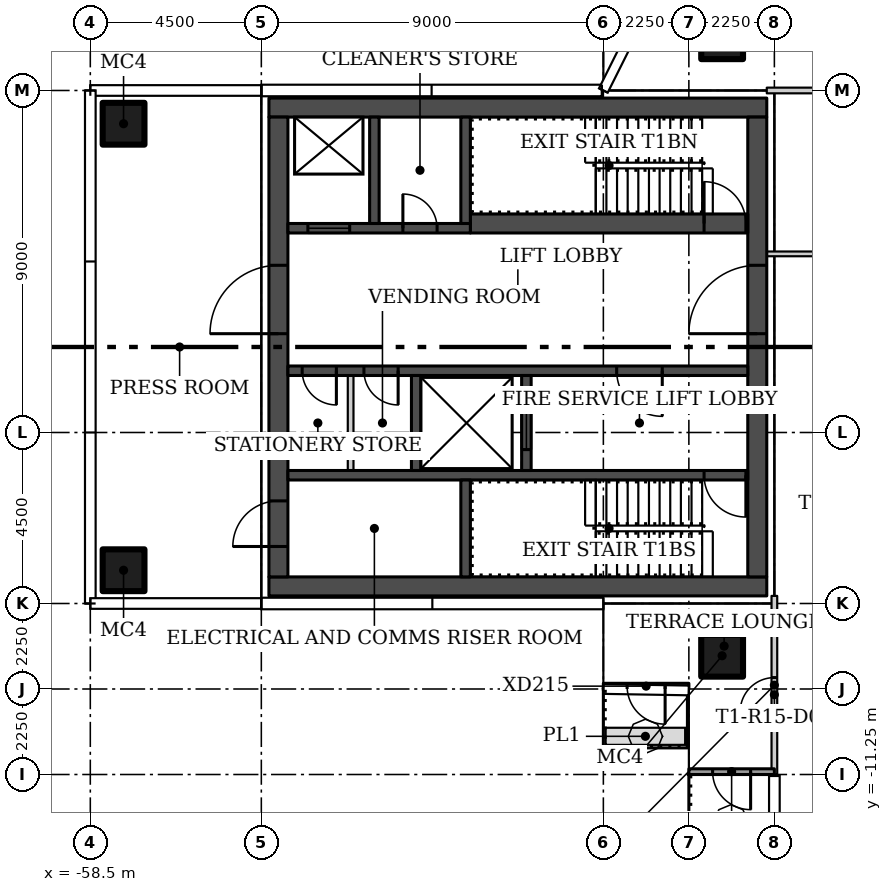
"""IFC4 building model, lengths in metres.
Left out: names, types, materials, properties, quantities, classifications, styles, units other than length and angle.
Written with IfcOpenShell. Run it as: python <this file> out.ifc"""

import sys

from ifc_helpers import new_model, si_unit, direction, frame, frame_2d, origin, origin_2d, place, context, subcontext, project, spatial, rectangle, hollow_rectangle, extrude, element, fill, save


model = new_model("IFC4")
c1 = context("Model", 3, precision=1e-05, world=origin(), true_north=direction((0.0, 1.0)))
c2 = subcontext(c1, "Body", "Model", "MODEL_VIEW")
j1 = project(units=[si_unit("LENGTHUNIT", "METRE"), si_unit("PLANEANGLEUNIT", "RADIAN")], contexts=[c1])
p1 = place(None, origin())
s1 = spatial("IfcSite", under=j1, at=p1, CompositionType="ELEMENT")
p2 = place(p1, origin())
s2 = spatial("IfcBuilding", under=s1, at=p2, CompositionType="ELEMENT")
p3 = place(p2, frame((0.0, 0.0, 142.8)))
s3 = spatial("IfcBuildingStorey", under=s2, at=p3, CompositionType="ELEMENT", Elevation=142.8)
for number, where in (
    (1, (-41.875, 8.125, 0.0)),
    (2, (-41.875, -8.125, 0.0)),
    (3, (-57.625, -5.875, 0.0)),
    (4, (-57.625, 5.875, 0.0)),
):
    element("IfcColumn", number, at=place(p3, frame(where)), inside=s3, PredefinedType="COLUMN", context=c2, shape_type="SweptSolid", body=[
        extrude(hollow_rectangle(XDim=1.1, YDim=1.1, WallThickness=0.04, at=origin_2d()), origin(), (0.0, 0.0, 1.0), 3.55),
    ])
p4 = place(p3, frame((-40.7, 2.45, 0.0)))
e5 = element("IfcWall", 5, at=p4, inside=s3, PredefinedType="PARTITIONING", context=c2, shape_type="SweptSolid", body=[
    extrude(rectangle(XDim=10.762, YDim=0.125, at=frame_2d((5.381, 0.0))), origin(), (0.0, 0.0, 1.0), 3.55),
])
p5 = place(p4, frame((5.0, 0.0, 0.0)))
e6 = element("IfcOpeningElement", 6, at=p5, cuts=e5, PredefinedType="OPENING", context=c2, shape_type="SweptSolid", body=[
    extrude(rectangle(XDim=0.9, YDim=2.1, at=frame_2d((0.45, 1.05))), frame((0.0, 0.073, 0.0), z_axis=(0.0, -1.0, 0.0), x_axis=(1.0, 0.0, 0.0)), (0.0, 0.0, 1.0), 0.145),
])
p6 = place(p3, frame((-40.5, -11.25, 0.0), z_axis=(0.0, 0.0, 1.0), x_axis=(0.0, 1.0, 0.0)))
e7 = element("IfcWall", 7, at=p6, inside=s3, PredefinedType="PARTITIONING", context=c2, shape_type="SweptSolid", body=[
    extrude(rectangle(XDim=4.7, YDim=0.15, at=frame_2d((2.35, 0.0))), origin(), (0.0, 0.0, 1.0), 3.55),
])
p7 = place(p6, frame((1.65, 0.0, 0.0)))
e8 = element("IfcOpeningElement", 8, at=p7, cuts=e7, PredefinedType="OPENING", context=c2, shape_type="SweptSolid", body=[
    extrude(rectangle(XDim=0.9, YDim=2.1, at=frame_2d((0.45, 1.05))), frame((0.0, 0.085, 0.0), z_axis=(0.0, -1.0, 0.0), x_axis=(1.0, 0.0, 0.0)), (0.0, 0.0, 1.0), 0.17),
])
p8 = place(p3, frame((-40.7, 6.75, 0.0)))
e9 = element("IfcWall", 9, at=p8, inside=s3, PredefinedType="PARTITIONING", context=c2, shape_type="SweptSolid", body=[
    extrude(rectangle(XDim=10.775, YDim=0.15, at=frame_2d((5.387, 0.0))), origin(), (0.0, 0.0, 1.0), 3.55),
])
p9 = place(p3, frame((-42.75, -8.925, 0.0), z_axis=(0.0, 0.0, 1.0), x_axis=(-1.0, 0.0, 0.0)))
e10 = element("IfcWall", 10, at=p9, inside=s3, PredefinedType="SOLIDWALL", context=c2, shape_type="SweptSolid", body=[
    extrude(rectangle(XDim=2.25, YDim=0.15, at=frame_2d((1.125, 0.0))), origin(), (0.0, 0.0, 1.0), 3.45),
])
p10 = place(p9, frame((0.625, 0.0, 0.0)))
e11 = element("IfcOpeningElement", 11, at=p10, cuts=e10, PredefinedType="OPENING", context=c2, shape_type="SweptSolid", body=[
    extrude(rectangle(XDim=1.0, YDim=2.4, at=frame_2d((0.5, 1.2))), frame((0.0, 0.085, 0.0), z_axis=(0.0, -1.0, 0.0), x_axis=(1.0, 0.0, 0.0)), (0.0, 0.0, 1.0), 0.17),
])
p11 = place(p3, frame((-40.5, -11.175, 0.0), z_axis=(0.0, 0.0, 1.0), x_axis=(-1.0, 0.0, 0.0)))
e12 = element("IfcWall", 12, at=p11, inside=s3, PredefinedType="SOLIDWALL", context=c2, shape_type="SweptSolid", body=[
    extrude(rectangle(XDim=2.25, YDim=0.15, at=frame_2d((1.125, 0.0))), origin(), (0.0, 0.0, 1.0), 3.45),
])
p12 = place(p11, frame((0.625, 0.0, 0.0)))
e13 = element("IfcOpeningElement", 13, at=p12, cuts=e12, PredefinedType="OPENING", context=c2, shape_type="SweptSolid", body=[
    extrude(rectangle(XDim=1.0, YDim=2.4, at=frame_2d((0.5, 1.2))), frame((0.0, 0.085, 0.0), z_axis=(0.0, -1.0, 0.0), x_axis=(1.0, 0.0, 0.0)), (0.0, 0.0, 1.0), 0.17),
])
for number, where, z_axis, x_axis in (
    (14, (-40.7, -6.3, 0.0), (0.0, 0.0, 1.0), (-1.0, 0.0, 0.0)),
    (15, (-40.7, 6.3, 0.0), (0.0, 0.0, 1.0), (-1.0, 0.0, 0.0)),
):
    element("IfcWall", number, at=place(p3, frame(where, z_axis=z_axis, x_axis=x_axis)), inside=s3, PredefinedType="SHEAR", context=c2, shape_type="SweptSolid", body=[
        extrude(rectangle(XDim=13.1, YDim=0.5, at=frame_2d((6.55, 0.0))), origin(), (0.0, 0.0, 1.0), 3.55),
    ])
p13 = place(p3, frame((-40.95, -6.05, 0.0), z_axis=(0.0, 0.0, 1.0), x_axis=(0.0, 1.0, 0.0)))
e16 = element("IfcWall", 16, at=p13, inside=s3, PredefinedType="SHEAR", context=c2, shape_type="SweptSolid", body=[
    extrude(rectangle(XDim=12.1, YDim=0.5, at=frame_2d((6.05, 0.0))), origin(), (0.0, 0.0, 1.0), 3.55),
])
p14 = place(p13, frame((6.4, 0.0, 0.0)))
e17 = element("IfcOpeningElement", 17, at=p14, cuts=e16, PredefinedType="OPENING", context=c2, shape_type="SweptSolid", body=[
    extrude(rectangle(XDim=1.8, YDim=2.4, at=frame_2d((0.9, 1.2))), frame((0.0, 0.26, 0.0), z_axis=(0.0, -1.0, 0.0), x_axis=(1.0, 0.0, 0.0)), (0.0, 0.0, 1.0), 0.52),
])
p15 = place(p3, frame((-53.55, -6.05, 0.0), z_axis=(0.0, 0.0, 1.0), x_axis=(0.0, 1.0, 0.0)))
e18 = element("IfcWall", 18, at=p15, inside=s3, PredefinedType="SHEAR", context=c2, shape_type="SweptSolid", body=[
    extrude(rectangle(XDim=12.1, YDim=0.5, at=frame_2d((6.05, 0.0))), origin(), (0.0, 0.0, 1.0), 3.55),
])
p16 = place(p15, frame((0.8, 0.0, 0.0)))
e19 = element("IfcOpeningElement", 19, at=p16, cuts=e18, PredefinedType="OPENING", context=c2, shape_type="SweptSolid", body=[
    extrude(rectangle(XDim=1.2, YDim=2.1, at=frame_2d((0.6, 1.05))), frame((0.0, 0.26, 0.0), z_axis=(0.0, -1.0, 0.0), x_axis=(1.0, 0.0, 0.0)), (0.0, 0.0, 1.0), 0.52),
])
p17 = place(p15, frame((6.4, 0.0, 0.0)))
e20 = element("IfcOpeningElement", 20, at=p17, cuts=e18, PredefinedType="OPENING", context=c2, shape_type="SweptSolid", body=[
    extrude(rectangle(XDim=1.8, YDim=2.4, at=frame_2d((0.9, 1.2))), frame((0.0, 0.26, 0.0), z_axis=(0.0, -1.0, 0.0), x_axis=(1.0, 0.0, 0.0)), (0.0, 0.0, 1.0), 0.52),
])
p18 = place(p3, frame((-41.2, -3.375, 0.0), z_axis=(0.0, 0.0, 1.0), x_axis=(-1.0, 0.0, 0.0)))
e21 = element("IfcWall", 21, at=p18, inside=s3, PredefinedType="SHEAR", context=c2, shape_type="SweptSolid", body=[
    extrude(rectangle(XDim=12.1, YDim=0.25, at=frame_2d((6.05, 0.0))), origin(), (0.0, 0.0, 1.0), 3.55),
])
p19 = place(p18, frame((0.05, 0.0, 0.0)))
e22 = element("IfcOpeningElement", 22, at=p19, cuts=e21, PredefinedType="OPENING", context=c2, shape_type="SweptSolid", body=[
    extrude(rectangle(XDim=1.1, YDim=2.1, at=frame_2d((0.55, 1.05))), frame((0.0, 0.135, 0.0), z_axis=(0.0, -1.0, 0.0), x_axis=(1.0, 0.0, 0.0)), (0.0, 0.0, 1.0), 0.27),
])
p20 = place(p3, frame((-48.625, -6.05, 0.0), z_axis=(0.0, 0.0, 1.0), x_axis=(0.0, 1.0, 0.0)))
e23 = element("IfcWall", 23, at=p20, inside=s3, PredefinedType="SHEAR", context=c2, shape_type="SweptSolid", body=[
    extrude(rectangle(XDim=2.55, YDim=0.25, at=frame_2d((1.275, 0.0))), origin(), (0.0, 0.0, 1.0), 3.55),
])
p21 = place(p3, frame((-41.2, -0.625, 0.0), z_axis=(0.0, 0.0, 1.0), x_axis=(-1.0, 0.0, 0.0)))
e24 = element("IfcWall", 24, at=p21, inside=s3, PredefinedType="SHEAR", context=c2, shape_type="SweptSolid", body=[
    extrude(rectangle(XDim=12.1, YDim=0.25, at=frame_2d((6.05, 0.0))), origin(), (0.0, 0.0, 1.0), 3.55),
])
p22 = place(p21, frame((2.25, 0.0, 0.0)))
e25 = element("IfcOpeningElement", 25, at=p22, cuts=e24, PredefinedType="OPENING", context=c2, shape_type="SweptSolid", body=[
    extrude(rectangle(XDim=1.2, YDim=2.1, at=frame_2d((0.6, 1.05))), frame((0.0, 0.135, 0.0), z_axis=(0.0, -1.0, 0.0), x_axis=(1.0, 0.0, 0.0)), (0.0, 0.0, 1.0), 0.27),
])
p23 = place(p21, frame((9.2, 0.0, 0.0)))
e26 = element("IfcOpeningElement", 26, at=p23, cuts=e24, PredefinedType="OPENING", context=c2, shape_type="SweptSolid", body=[
    extrude(rectangle(XDim=0.9, YDim=2.1, at=frame_2d((0.45, 1.05))), frame((0.0, 0.135, 0.0), z_axis=(0.0, -1.0, 0.0), x_axis=(1.0, 0.0, 0.0)), (0.0, 0.0, 1.0), 0.27),
])
p24 = place(p21, frame((10.825, 0.0, 0.0)))
e27 = element("IfcOpeningElement", 27, at=p24, cuts=e24, PredefinedType="OPENING", context=c2, shape_type="SweptSolid", body=[
    extrude(rectangle(XDim=0.9, YDim=2.1, at=frame_2d((0.45, 1.05))), frame((0.0, 0.135, 0.0), z_axis=(0.0, -1.0, 0.0), x_axis=(1.0, 0.0, 0.0)), (0.0, 0.0, 1.0), 0.27),
])
p25 = place(p3, frame((-47.025, -3.25, 0.0), z_axis=(0.0, 0.0, 1.0), x_axis=(0.0, 1.0, 0.0)))
e28 = element("IfcWall", 28, at=p25, inside=s3, PredefinedType="SHEAR", context=c2, shape_type="SweptSolid", body=[
    extrude(rectangle(XDim=2.5, YDim=0.25, at=frame_2d((1.25, 0.0))), origin(), (0.0, 0.0, 1.0), 3.55),
])
p26 = place(p25, frame((0.55, 0.0, 0.0)))
e29 = element("IfcOpeningElement", 29, at=p26, cuts=e28, PredefinedType="OPENING", context=c2, shape_type="SweptSolid", body=[
    extrude(rectangle(XDim=1.4, YDim=2.4, at=frame_2d((0.7, 1.2))), frame((0.0, 0.135, 0.0), z_axis=(0.0, -1.0, 0.0), x_axis=(1.0, 0.0, 0.0)), (0.0, 0.0, 1.0), 0.27),
])
p27 = place(p3, frame((-49.925, -3.25, 0.0), z_axis=(0.0, 0.0, 1.0), x_axis=(0.0, 1.0, 0.0)))
e30 = element("IfcWall", 30, at=p27, inside=s3, PredefinedType="SHEAR", context=c2, shape_type="SweptSolid", body=[
    extrude(rectangle(XDim=2.5, YDim=0.25, at=frame_2d((1.25, 0.0))), origin(), (0.0, 0.0, 1.0), 3.55),
])
p28 = place(p3, frame((-51.65, -3.25, 0.0), z_axis=(0.0, 0.0, 1.0), x_axis=(0.0, 1.0, 0.0)))
e31 = element("IfcWall", 31, at=p28, inside=s3, PredefinedType="PARTITIONING", context=c2, shape_type="SweptSolid", body=[
    extrude(rectangle(XDim=2.5, YDim=0.15, at=frame_2d((1.25, 0.0))), origin(), (0.0, 0.0, 1.0), 3.55),
])
p29 = place(p3, frame((-48.5, 3.25, 0.0)))
e32 = element("IfcWall", 32, at=p29, inside=s3, PredefinedType="SHEAR", context=c2, shape_type="SweptSolid", body=[
    extrude(rectangle(XDim=7.3, YDim=0.5, at=frame_2d((3.65, 0.0))), origin(), (0.0, 0.0, 1.0), 3.55),
])
p30 = place(p29, frame((6.15, 0.0, 0.0)))
e33 = element("IfcOpeningElement", 33, at=p30, cuts=e32, PredefinedType="OPENING", context=c2, shape_type="SweptSolid", body=[
    extrude(rectangle(XDim=1.1, YDim=2.1, at=frame_2d((0.55, 1.05))), frame((0.0, 0.26, 0.0), z_axis=(0.0, -1.0, 0.0), x_axis=(1.0, 0.0, 0.0)), (0.0, 0.0, 1.0), 0.52),
])
p31 = place(p3, frame((-53.3, 3.125, 0.0)))
e34 = element("IfcWall", 34, at=p31, inside=s3, PredefinedType="SHEAR", context=c2, shape_type="SweptSolid", body=[
    extrude(rectangle(XDim=4.8, YDim=0.25, at=frame_2d((2.4, 0.0))), origin(), (0.0, 0.0, 1.0), 3.55),
])
p32 = place(p31, frame((0.525, 0.0, 0.0)))
e35 = element("IfcOpeningElement", 35, at=p32, cuts=e34, PredefinedType="OPENING", context=c2, shape_type="SweptSolid", body=[
    extrude(rectangle(XDim=1.1, YDim=2.1, at=frame_2d((0.55, 1.05))), frame((0.0, 0.135, 0.0), z_axis=(0.0, -1.0, 0.0), x_axis=(1.0, 0.0, 0.0)), (0.0, 0.0, 1.0), 0.27),
])
p33 = place(p31, frame((3.025, 0.0, 0.0)))
e36 = element("IfcOpeningElement", 36, at=p33, cuts=e34, PredefinedType="OPENING", context=c2, shape_type="SweptSolid", body=[
    extrude(rectangle(XDim=0.9, YDim=2.1, at=frame_2d((0.45, 1.05))), frame((0.0, 0.135, 0.0), z_axis=(0.0, -1.0, 0.0), x_axis=(1.0, 0.0, 0.0)), (0.0, 0.0, 1.0), 0.27),
])
for number, where, z_axis, x_axis in (
    (37, (-48.625, 3.25, 0.0), (0.0, 0.0, 1.0), (0.0, 1.0, 0.0)),
    (38, (-51.025, 3.25, 0.0), (0.0, 0.0, 1.0), (0.0, 1.0, 0.0)),
):
    element("IfcWall", number, at=place(p3, frame(where, z_axis=z_axis, x_axis=x_axis)), inside=s3, PredefinedType="SHEAR", context=c2, shape_type="SweptSolid", body=[
        extrude(rectangle(XDim=2.8, YDim=0.25, at=frame_2d((1.4, 0.0))), origin(), (0.0, 0.0, 1.0), 3.55),
    ])
p34 = place(p7, origin())
e39 = element("IfcDoor", 39, at=p34, inside=s3, OperationType="SINGLE_SWING_RIGHT", PredefinedType="DOOR", context=c2, shape_type="SweptSolid", body=[
    extrude(rectangle(XDim=0.9, YDim=2.1, at=frame_2d((0.45, 1.05))), frame((0.0, 0.025, 0.0), z_axis=(0.0, -1.0, 0.0), x_axis=(1.0, 0.0, 0.0)), (0.0, 0.0, 1.0), 0.05),
])
fill(e8, e39)
p35 = place(p10, origin())
e40 = element("IfcDoor", 40, at=p35, inside=s3, OperationType="SINGLE_SWING_LEFT", PredefinedType="DOOR", context=c2, shape_type="SweptSolid", body=[
    extrude(rectangle(XDim=1.0, YDim=2.4, at=frame_2d((0.5, 1.2))), frame((0.0, 0.025, 0.0), z_axis=(0.0, -1.0, 0.0), x_axis=(1.0, 0.0, 0.0)), (0.0, 0.0, 1.0), 0.05),
])
fill(e11, e40)
p36 = place(p12, origin())
e41 = element("IfcDoor", 41, at=p36, inside=s3, OperationType="SINGLE_SWING_RIGHT", PredefinedType="DOOR", context=c2, shape_type="SweptSolid", body=[
    extrude(rectangle(XDim=1.0, YDim=2.4, at=frame_2d((0.5, 1.2))), frame((0.0, 0.025, 0.0), z_axis=(0.0, -1.0, 0.0), x_axis=(1.0, 0.0, 0.0)), (0.0, 0.0, 1.0), 0.05),
])
fill(e13, e41)
p37 = place(p14, origin())
e42 = element("IfcDoor", 42, at=p37, inside=s3, OperationType="DOUBLE_DOOR_SINGLE_SWING", PredefinedType="DOOR", context=c2, shape_type="SweptSolid", body=[
    extrude(rectangle(XDim=1.8, YDim=2.4, at=frame_2d((0.9, 1.2))), frame((0.0, 0.025, 0.0), z_axis=(0.0, -1.0, 0.0), x_axis=(1.0, 0.0, 0.0)), (0.0, 0.0, 1.0), 0.05),
])
fill(e17, e42)
p38 = place(p16, origin())
e43 = element("IfcDoor", 43, at=p38, inside=s3, OperationType="SINGLE_SWING_LEFT", PredefinedType="DOOR", context=c2, shape_type="SweptSolid", body=[
    extrude(rectangle(XDim=1.2, YDim=2.1, at=frame_2d((0.6, 1.05))), frame((0.0, 0.025, 0.0), z_axis=(0.0, -1.0, 0.0), x_axis=(1.0, 0.0, 0.0)), (0.0, 0.0, 1.0), 0.05),
])
fill(e19, e43)
p39 = place(p17, origin())
e44 = element("IfcDoor", 44, at=p39, inside=s3, OperationType="DOUBLE_DOOR_SINGLE_SWING", PredefinedType="DOOR", context=c2, shape_type="SweptSolid", body=[
    extrude(rectangle(XDim=1.8, YDim=2.4, at=frame_2d((0.9, 1.2))), frame((0.0, 0.025, 0.0), z_axis=(0.0, -1.0, 0.0), x_axis=(1.0, 0.0, 0.0)), (0.0, 0.0, 1.0), 0.05),
])
fill(e20, e44)
p40 = place(p19, origin())
e45 = element("IfcDoor", 45, at=p40, inside=s3, OperationType="SINGLE_SWING_LEFT", PredefinedType="DOOR", context=c2, shape_type="SweptSolid", body=[
    extrude(rectangle(XDim=1.1, YDim=2.1, at=frame_2d((0.55, 1.05))), frame((0.0, 0.025, 0.0), z_axis=(0.0, -1.0, 0.0), x_axis=(1.0, 0.0, 0.0)), (0.0, 0.0, 1.0), 0.05),
])
fill(e22, e45)
p41 = place(p22, origin())
e46 = element("IfcDoor", 46, at=p41, inside=s3, OperationType="SINGLE_SWING_LEFT", PredefinedType="DOOR", context=c2, shape_type="SweptSolid", body=[
    extrude(rectangle(XDim=1.2, YDim=2.1, at=frame_2d((0.6, 1.05))), frame((0.0, 0.025, 0.0), z_axis=(0.0, -1.0, 0.0), x_axis=(1.0, 0.0, 0.0)), (0.0, 0.0, 1.0), 0.05),
])
fill(e25, e46)
p42 = place(p23, origin())
e47 = element("IfcDoor", 47, at=p42, inside=s3, OperationType="SINGLE_SWING_RIGHT", PredefinedType="DOOR", context=c2, shape_type="SweptSolid", body=[
    extrude(rectangle(XDim=0.9, YDim=2.1, at=frame_2d((0.45, 1.05))), frame((0.0, 0.025, 0.0), z_axis=(0.0, -1.0, 0.0), x_axis=(1.0, 0.0, 0.0)), (0.0, 0.0, 1.0), 0.05),
])
fill(e26, e47)
p43 = place(p24, origin())
e48 = element("IfcDoor", 48, at=p43, inside=s3, OperationType="SINGLE_SWING_RIGHT", PredefinedType="DOOR", context=c2, shape_type="SweptSolid", body=[
    extrude(rectangle(XDim=0.9, YDim=2.1, at=frame_2d((0.45, 1.05))), frame((0.0, 0.025, 0.0), z_axis=(0.0, -1.0, 0.0), x_axis=(1.0, 0.0, 0.0)), (0.0, 0.0, 1.0), 0.05),
])
fill(e27, e48)
p44 = place(p26, origin())
e49 = element("IfcDoor", 49, at=p44, inside=s3, OperationType="SLIDING_TO_LEFT", PredefinedType="DOOR", context=c2, shape_type="SweptSolid", body=[
    extrude(rectangle(XDim=1.4, YDim=2.4, at=frame_2d((0.7, 1.2))), frame((0.0, 0.025, 0.0), z_axis=(0.0, -1.0, 0.0), x_axis=(1.0, 0.0, 0.0)), (0.0, 0.0, 1.0), 0.05),
])
fill(e29, e49)
p45 = place(p30, origin())
e50 = element("IfcDoor", 50, at=p45, inside=s3, OperationType="SINGLE_SWING_RIGHT", PredefinedType="DOOR", context=c2, shape_type="SweptSolid", body=[
    extrude(rectangle(XDim=1.1, YDim=2.1, at=frame_2d((0.55, 1.05))), frame((0.0, 0.025, 0.0), z_axis=(0.0, -1.0, 0.0), x_axis=(1.0, 0.0, 0.0)), (0.0, 0.0, 1.0), 0.05),
])
fill(e33, e50)
p46 = place(p32, origin())
e51 = element("IfcDoor", 51, at=p46, inside=s3, OperationType="SLIDING_TO_LEFT", PredefinedType="DOOR", context=c2, shape_type="SweptSolid", body=[
    extrude(rectangle(XDim=1.1, YDim=2.1, at=frame_2d((0.55, 1.05))), frame((0.0, 0.025, 0.0), z_axis=(0.0, -1.0, 0.0), x_axis=(1.0, 0.0, 0.0)), (0.0, 0.0, 1.0), 0.05),
])
fill(e35, e51)
p47 = place(p33, origin())
e52 = element("IfcDoor", 52, at=p47, inside=s3, OperationType="SINGLE_SWING_RIGHT", PredefinedType="DOOR", context=c2, shape_type="SweptSolid", body=[
    extrude(rectangle(XDim=0.9, YDim=2.1, at=frame_2d((0.45, 1.05))), frame((0.0, 0.025, 0.0), z_axis=(0.0, -1.0, 0.0), x_axis=(1.0, 0.0, 0.0)), (0.0, 0.0, 1.0), 0.05),
])
fill(e36, e52)
save(model, sys.argv[1])
